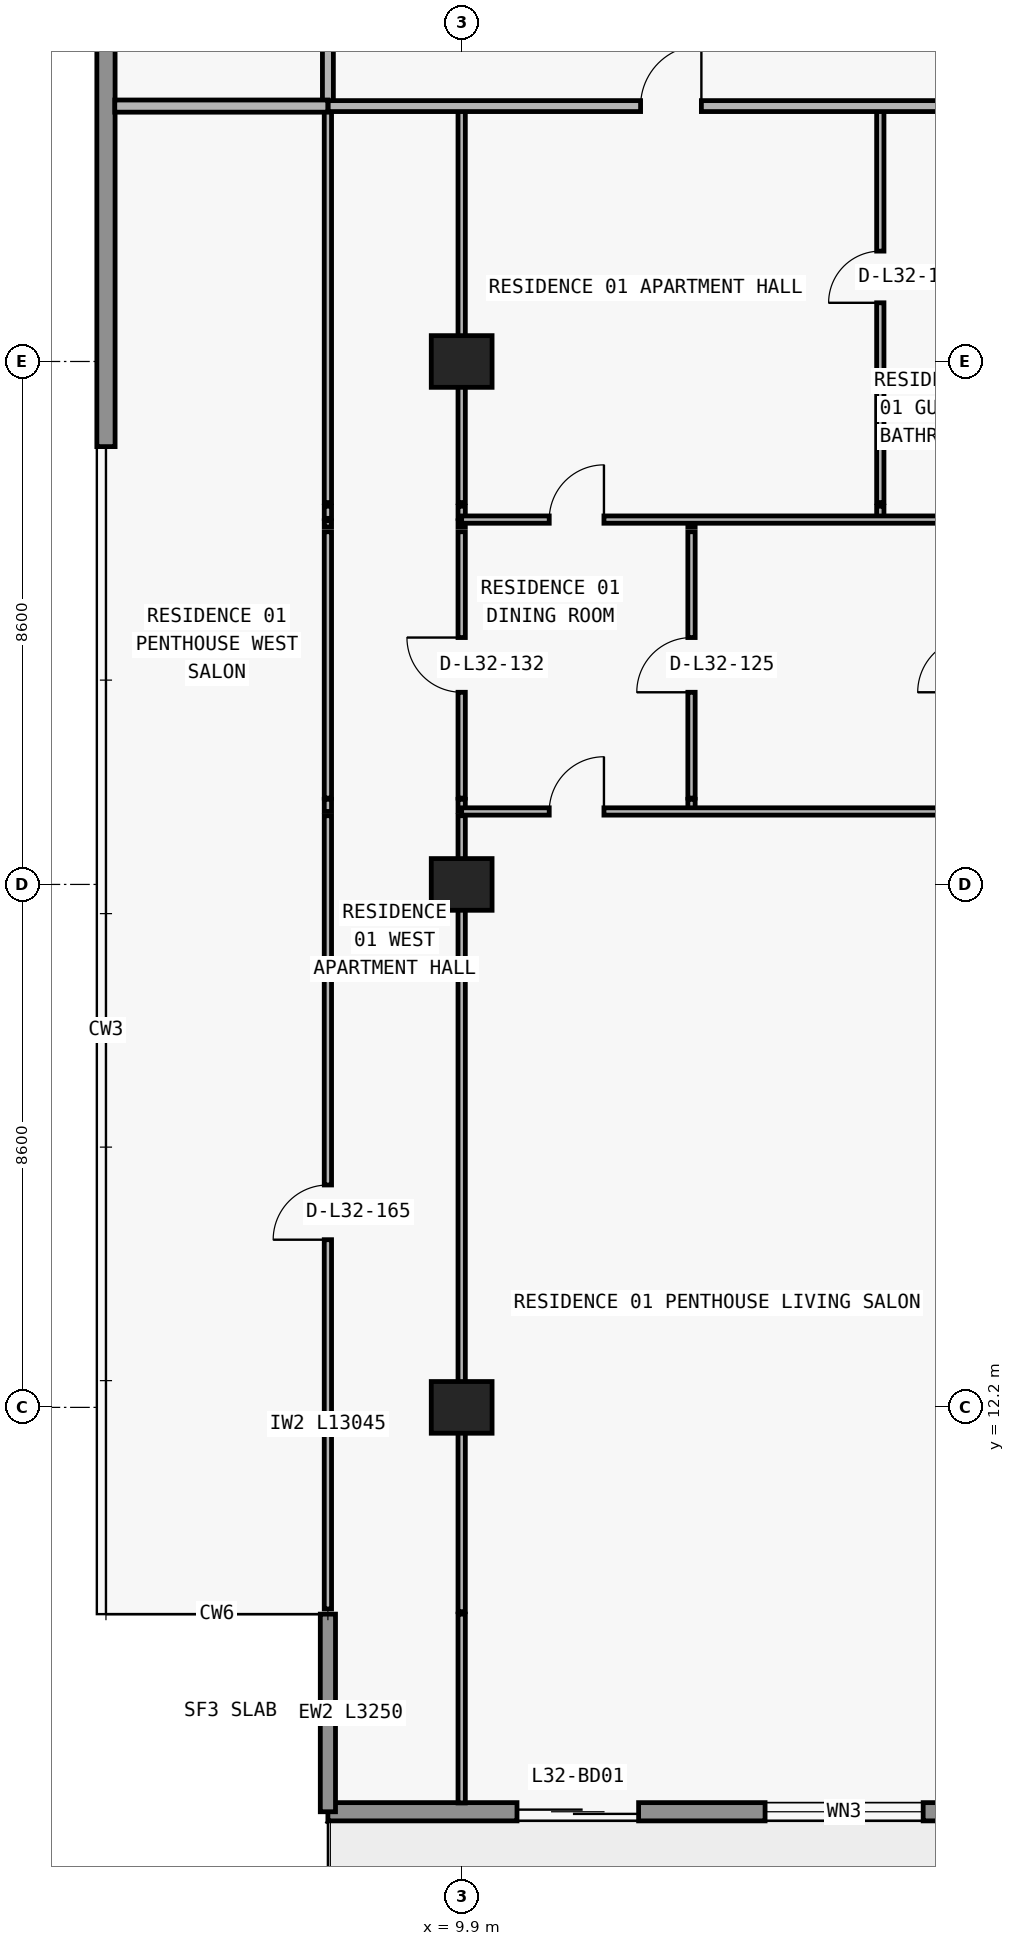
"""IFC4 building model, lengths in metres.
Left out: names, types, materials, properties, quantities, classifications, styles, units other than length and angle.
Written with IfcOpenShell. Run it as: python <this file> out.ifc"""

import sys

from ifc_helpers import new_model, si_unit, direction, frame, frame_2d, origin, origin_2d, place, context, subcontext, project, spatial, rectangle, extrude, element, fill, save


model = new_model("IFC4")
c1 = context("Model", 3, precision=1e-05, world=origin(), true_north=direction((0.0, 1.0)))
c2 = subcontext(c1, "Body", "Model", "MODEL_VIEW")
j1 = project(units=[si_unit("LENGTHUNIT", "METRE"), si_unit("PLANEANGLEUNIT", "RADIAN")], contexts=[c1])
p1 = place(None, origin())
s1 = spatial("IfcSite", under=j1, at=p1, CompositionType="ELEMENT")
p2 = place(p1, origin())
s2 = spatial("IfcBuilding", under=s1, at=p2, CompositionType="ELEMENT")
p3 = place(p2, frame((0.0, 0.0, 119.1)))
s3 = spatial("IfcBuildingStorey", under=s2, at=p3, CompositionType="ELEMENT", Elevation=119.1)
for number, where, z_axis, x_axis in (
    (1, (9.9, 12.2, 0.0), (0.0, 0.0, 1.0), (1.0, 0.0, 0.0)),
    (2, (9.9, 20.8, 0.0), (0.0, 0.0, 1.0), (1.0, 0.0, 0.0)),
    (3, (9.9, 29.4, 0.0), (0.0, 0.0, 1.0), (1.0, 0.0, 0.0)),
):
    element("IfcColumn", number, at=place(p3, frame(where, z_axis=z_axis, x_axis=x_axis)), inside=s3, PredefinedType="COLUMN", context=c2, shape_type="SweptSolid", body=[
        extrude(rectangle(XDim=1.0, YDim=0.85, at=origin_2d()), origin(), (0.0, 0.0, 1.0), 3.05),
    ])
p4 = place(p3, frame((70.1, 5.55, 0.0), z_axis=(0.0, 0.0, 1.0), x_axis=(-1.0, 0.0, 0.0)))
e4 = element("IfcWall", 4, at=p4, inside=s3, PredefinedType="STANDARD", context=c2, shape_type="SweptSolid", body=[
    extrude(rectangle(XDim=62.4, YDim=0.3, at=frame_2d((31.2, 0.0))), origin(), (0.0, 0.0, 1.0), 3.05),
])
p5 = place(p4, frame((57.29, 0.0, 0.0)))
e5 = element("IfcOpeningElement", 5, at=p5, cuts=e4, PredefinedType="OPENING", context=c2, shape_type="SweptSolid", body=[
    extrude(rectangle(XDim=2.0, YDim=2.3, at=frame_2d((1.0, 1.15))), frame((0.0, 0.16, 0.0), z_axis=(0.0, -1.0, 0.0), x_axis=(1.0, 0.0, 0.0)), (0.0, 0.0, 1.0), 0.32),
])
p6 = place(p4, frame((52.61, 0.0, 0.65)))
e6 = element("IfcOpeningElement", 6, at=p6, cuts=e4, PredefinedType="OPENING", context=c2, shape_type="SweptSolid", body=[
    extrude(rectangle(XDim=2.6, YDim=1.85, at=frame_2d((1.3, 0.925))), frame((0.0, 0.16, 0.0), z_axis=(0.0, -1.0, 0.0), x_axis=(1.0, 0.0, 0.0)), (0.0, 0.0, 1.0), 0.32),
])
p7 = place(p4, frame((46.5, 0.0, 0.85)))
e7 = element("IfcOpeningElement", 7, at=p7, cuts=e4, PredefinedType="OPENING", context=c2, shape_type="SweptSolid", body=[
    extrude(rectangle(XDim=2.2, YDim=1.55, at=frame_2d((1.1, 0.775))), frame((0.0, 0.16, 0.0), z_axis=(0.0, -1.0, 0.0), x_axis=(1.0, 0.0, 0.0)), (0.0, 0.0, 1.0), 0.32),
])
p8 = place(p4, frame((40.49, 0.0, 0.0)))
e8 = element("IfcOpeningElement", 8, at=p8, cuts=e4, PredefinedType="OPENING", context=c2, shape_type="SweptSolid", body=[
    extrude(rectangle(XDim=2.0, YDim=2.3, at=frame_2d((1.0, 1.15))), frame((0.0, 0.16, 0.0), z_axis=(0.0, -1.0, 0.0), x_axis=(1.0, 0.0, 0.0)), (0.0, 0.0, 1.0), 0.32),
])
p9 = place(p4, frame((35.81, 0.0, 0.65)))
e9 = element("IfcOpeningElement", 9, at=p9, cuts=e4, PredefinedType="OPENING", context=c2, shape_type="SweptSolid", body=[
    extrude(rectangle(XDim=2.6, YDim=1.85, at=frame_2d((1.3, 0.925))), frame((0.0, 0.16, 0.0), z_axis=(0.0, -1.0, 0.0), x_axis=(1.0, 0.0, 0.0)), (0.0, 0.0, 1.0), 0.32),
])
p10 = place(p4, frame((30.1, 0.0, 0.85)))
e10 = element("IfcOpeningElement", 10, at=p10, cuts=e4, PredefinedType="OPENING", context=c2, shape_type="SweptSolid", body=[
    extrude(rectangle(XDim=2.2, YDim=1.55, at=frame_2d((1.1, 0.775))), frame((0.0, 0.16, 0.0), z_axis=(0.0, -1.0, 0.0), x_axis=(1.0, 0.0, 0.0)), (0.0, 0.0, 1.0), 0.32),
])
p11 = place(p4, frame((24.426, 0.0, 0.0)))
e11 = element("IfcOpeningElement", 11, at=p11, cuts=e4, PredefinedType="OPENING", context=c2, shape_type="SweptSolid", body=[
    extrude(rectangle(XDim=2.0, YDim=2.3, at=frame_2d((1.0, 1.15))), frame((0.0, 0.16, 0.0), z_axis=(0.0, -1.0, 0.0), x_axis=(1.0, 0.0, 0.0)), (0.0, 0.0, 1.0), 0.32),
])
p12 = place(p4, frame((20.126, 0.0, 0.85)))
e12 = element("IfcOpeningElement", 12, at=p12, cuts=e4, PredefinedType="OPENING", context=c2, shape_type="SweptSolid", body=[
    extrude(rectangle(XDim=2.2, YDim=1.55, at=frame_2d((1.1, 0.775))), frame((0.0, 0.16, 0.0), z_axis=(0.0, -1.0, 0.0), x_axis=(1.0, 0.0, 0.0)), (0.0, 0.0, 1.0), 0.32),
])
p13 = place(p4, frame((15.69, 0.0, 0.0)))
e13 = element("IfcOpeningElement", 13, at=p13, cuts=e4, PredefinedType="OPENING", context=c2, shape_type="SweptSolid", body=[
    extrude(rectangle(XDim=2.0, YDim=2.3, at=frame_2d((1.0, 1.15))), frame((0.0, 0.16, 0.0), z_axis=(0.0, -1.0, 0.0), x_axis=(1.0, 0.0, 0.0)), (0.0, 0.0, 1.0), 0.32),
])
p14 = place(p4, frame((11.59, 0.0, 0.85)))
e14 = element("IfcOpeningElement", 14, at=p14, cuts=e4, PredefinedType="OPENING", context=c2, shape_type="SweptSolid", body=[
    extrude(rectangle(XDim=1.8, YDim=1.55, at=frame_2d((0.9, 0.775))), frame((0.0, 0.16, 0.0), z_axis=(0.0, -1.0, 0.0), x_axis=(1.0, 0.0, 0.0)), (0.0, 0.0, 1.0), 0.32),
])
p15 = place(p4, frame((7.626, 0.0, 0.0)))
e15 = element("IfcOpeningElement", 15, at=p15, cuts=e4, PredefinedType="OPENING", context=c2, shape_type="SweptSolid", body=[
    extrude(rectangle(XDim=2.0, YDim=2.3, at=frame_2d((1.0, 1.15))), frame((0.0, 0.16, 0.0), z_axis=(0.0, -1.0, 0.0), x_axis=(1.0, 0.0, 0.0)), (0.0, 0.0, 1.0), 0.32),
])
p16 = place(p4, frame((3.326, 0.0, 0.85)))
e16 = element("IfcOpeningElement", 16, at=p16, cuts=e4, PredefinedType="OPENING", context=c2, shape_type="SweptSolid", body=[
    extrude(rectangle(XDim=2.2, YDim=1.55, at=frame_2d((1.1, 0.775))), frame((0.0, 0.16, 0.0), z_axis=(0.0, -1.0, 0.0), x_axis=(1.0, 0.0, 0.0)), (0.0, 0.0, 1.0), 0.32),
])
p17 = place(p3, frame((7.7, 8.8, 0.0), z_axis=(0.0, 0.0, 1.0), x_axis=(0.0, -1.0, 0.0)))
e17 = element("IfcWall", 17, at=p17, inside=s3, PredefinedType="ELEMENTEDWALL", context=c2, shape_type="SweptSolid", body=[
    extrude(rectangle(XDim=3.25, YDim=0.25, at=frame_2d((1.625, 0.0))), origin(), (0.0, 0.0, 1.0), 3.05),
])
p18 = place(p3, frame((4.05, 28.0, 0.0), z_axis=(0.0, 0.0, 1.0), x_axis=(0.0, 1.0, 0.0)))
e18 = element("IfcWall", 18, at=p18, inside=s3, PredefinedType="STANDARD", context=c2, shape_type="SweptSolid", body=[
    extrude(rectangle(XDim=19.2, YDim=0.3, at=frame_2d((9.6, 0.0))), origin(), (0.0, 0.0, 1.0), 3.05),
])
p19 = place(p3, frame((7.7, 8.885, 0.0), z_axis=(0.0, 0.0, 1.0), x_axis=(0.0, 1.0, 0.0)))
e19 = element("IfcWall", 19, at=p19, inside=s3, PredefinedType="PARTITIONING", context=c2, shape_type="SweptSolid", body=[
    extrude(rectangle(XDim=13.045, YDim=0.12, at=frame_2d((6.522, 0.0))), origin(), (0.0, 0.0, 1.0), 3.05),
])
p20 = place(p19, frame((6.073, 0.0, 0.0)))
e20 = element("IfcOpeningElement", 20, at=p20, cuts=e19, PredefinedType="OPENING", context=c2, shape_type="SweptSolid", body=[
    extrude(rectangle(XDim=0.9, YDim=2.15, at=frame_2d((0.45, 1.075))), frame((0.0, 0.07, 0.0), z_axis=(0.0, -1.0, 0.0), x_axis=(1.0, 0.0, 0.0)), (0.0, 0.0, 1.0), 0.14),
])
p21 = place(p3, frame((7.7, 22.0, 0.0), z_axis=(0.0, 0.0, 1.0), x_axis=(0.0, 1.0, 0.0)))
e21 = element("IfcWall", 21, at=p21, inside=s3, PredefinedType="PARTITIONING", context=c2, shape_type="SweptSolid", body=[
    extrude(rectangle(XDim=0.2, YDim=0.12, at=frame_2d((0.1, 0.0))), origin(), (0.0, 0.0, 1.0), 3.05),
])
p22 = place(p3, frame((7.7, 22.22, 0.0), z_axis=(0.0, 0.0, 1.0), x_axis=(0.0, 1.0, 0.0)))
e22 = element("IfcWall", 22, at=p22, inside=s3, PredefinedType="PARTITIONING", context=c2, shape_type="SweptSolid", body=[
    extrude(rectangle(XDim=4.38, YDim=0.12, at=frame_2d((2.19, 0.0))), origin(), (0.0, 0.0, 1.0), 3.05),
])
p23 = place(p3, frame((7.7, 26.68, 0.0), z_axis=(0.0, 0.0, 1.0), x_axis=(0.0, 1.0, 0.0)))
e23 = element("IfcWall", 23, at=p23, inside=s3, PredefinedType="PARTITIONING", context=c2, shape_type="SweptSolid", body=[
    extrude(rectangle(XDim=0.1, YDim=0.12, at=frame_2d((0.05, 0.0))), origin(), (0.0, 0.0, 1.0), 3.05),
])
p24 = place(p3, frame((7.7, 26.82, 0.0), z_axis=(0.0, 0.0, 1.0), x_axis=(0.0, 1.0, 0.0)))
e24 = element("IfcWall", 24, at=p24, inside=s3, PredefinedType="PARTITIONING", context=c2, shape_type="SweptSolid", body=[
    extrude(rectangle(XDim=0.2, YDim=0.12, at=frame_2d((0.1, 0.0))), origin(), (0.0, 0.0, 1.0), 3.05),
])
p25 = place(p3, frame((7.7, 27.08, 0.0), z_axis=(0.0, 0.0, 1.0), x_axis=(0.0, 1.0, 0.0)))
e25 = element("IfcWall", 25, at=p25, inside=s3, PredefinedType="PARTITIONING", context=c2, shape_type="SweptSolid", body=[
    extrude(rectangle(XDim=6.52, YDim=0.12, at=frame_2d((3.26, 0.0))), origin(), (0.0, 0.0, 1.0), 3.05),
])
p26 = place(p3, frame((7.7, 33.605, 0.0), z_axis=(0.0, 0.0, 1.0), x_axis=(0.0, 1.0, 0.0)))
e26 = element("IfcWall", 26, at=p26, inside=s3, PredefinedType="PARTITIONING", context=c2, shape_type="SweptSolid", body=[
    extrude(rectangle(XDim=3.345, YDim=0.18, at=frame_2d((1.672, 0.0))), origin(), (0.0, 0.0, 1.0), 3.05),
])
p27 = place(p3, frame((9.9, 5.695, 0.0), z_axis=(0.0, 0.0, 1.0), x_axis=(0.0, 1.0, 0.0)))
e27 = element("IfcWall", 27, at=p27, inside=s3, PredefinedType="PARTITIONING", context=c2, shape_type="SweptSolid", body=[
    extrude(rectangle(XDim=3.105, YDim=0.12, at=frame_2d((1.552, 0.0))), origin(), (0.0, 0.0, 1.0), 3.05),
])
p28 = place(p3, frame((9.9, 8.84, 0.0), z_axis=(0.0, 0.0, 1.0), x_axis=(0.0, 1.0, 0.0)))
e28 = element("IfcWall", 28, at=p28, inside=s3, PredefinedType="PARTITIONING", context=c2, shape_type="SweptSolid", body=[
    extrude(rectangle(XDim=13.09, YDim=0.12, at=frame_2d((6.545, 0.0))), origin(), (0.0, 0.0, 1.0), 2.174),
])
p29 = place(p3, frame((9.9, 22.0, 0.0), z_axis=(0.0, 0.0, 1.0), x_axis=(0.0, 1.0, 0.0)))
e29 = element("IfcWall", 29, at=p29, inside=s3, PredefinedType="PARTITIONING", context=c2, shape_type="SweptSolid", body=[
    extrude(rectangle(XDim=0.2, YDim=0.12, at=frame_2d((0.1, 0.0))), origin(), (0.0, 0.0, 1.0), 2.174),
])
p30 = place(p3, frame((9.9, 22.22, 0.0), z_axis=(0.0, 0.0, 1.0), x_axis=(0.0, 1.0, 0.0)))
e30 = element("IfcWall", 30, at=p30, inside=s3, PredefinedType="PARTITIONING", context=c2, shape_type="SweptSolid", body=[
    extrude(rectangle(XDim=4.38, YDim=0.12, at=frame_2d((2.19, 0.0))), origin(), (0.0, 0.0, 1.0), 2.174),
])
p31 = place(p30, frame((1.74, 0.0, 0.0)))
e31 = element("IfcOpeningElement", 31, at=p31, cuts=e30, PredefinedType="OPENING", context=c2, shape_type="SweptSolid", body=[
    extrude(rectangle(XDim=0.9, YDim=2.124, at=frame_2d((0.45, 1.062))), frame((0.0, 0.07, 0.0), z_axis=(0.0, -1.0, 0.0), x_axis=(1.0, 0.0, 0.0)), (0.0, 0.0, 1.0), 0.14),
])
p32 = place(p3, frame((9.9, 26.68, 0.0), z_axis=(0.0, 0.0, 1.0), x_axis=(0.0, 1.0, 0.0)))
e32 = element("IfcWall", 32, at=p32, inside=s3, PredefinedType="PARTITIONING", context=c2, shape_type="SweptSolid", body=[
    extrude(rectangle(XDim=0.1, YDim=0.12, at=frame_2d((0.05, 0.0))), origin(), (0.0, 0.0, 1.0), 2.174),
])
p33 = place(p3, frame((9.9, 26.82, 0.0), z_axis=(0.0, 0.0, 1.0), x_axis=(0.0, 1.0, 0.0)))
e33 = element("IfcWall", 33, at=p33, inside=s3, PredefinedType="PARTITIONING", context=c2, shape_type="SweptSolid", body=[
    extrude(rectangle(XDim=0.2, YDim=0.12, at=frame_2d((0.1, 0.0))), origin(), (0.0, 0.0, 1.0), 2.174),
])
p34 = place(p3, frame((9.9, 27.08, 0.0), z_axis=(0.0, 0.0, 1.0), x_axis=(0.0, 1.0, 0.0)))
e34 = element("IfcWall", 34, at=p34, inside=s3, PredefinedType="PARTITIONING", context=c2, shape_type="SweptSolid", body=[
    extrude(rectangle(XDim=6.52, YDim=0.12, at=frame_2d((3.26, 0.0))), origin(), (0.0, 0.0, 1.0), 2.174),
])
p35 = place(p3, frame((13.68, 22.0, 0.0), z_axis=(0.0, 0.0, 1.0), x_axis=(0.0, 1.0, 0.0)))
e35 = element("IfcWall", 35, at=p35, inside=s3, PredefinedType="PARTITIONING", context=c2, shape_type="SweptSolid", body=[
    extrude(rectangle(XDim=0.2, YDim=0.12, at=frame_2d((0.1, 0.0))), origin(), (0.0, 0.0, 1.0), 3.05),
])
p36 = place(p3, frame((13.68, 22.22, 0.0), z_axis=(0.0, 0.0, 1.0), x_axis=(0.0, 1.0, 0.0)))
e36 = element("IfcWall", 36, at=p36, inside=s3, PredefinedType="PARTITIONING", context=c2, shape_type="SweptSolid", body=[
    extrude(rectangle(XDim=4.38, YDim=0.12, at=frame_2d((2.19, 0.0))), origin(), (0.0, 0.0, 1.0), 3.05),
])
p37 = place(p36, frame((1.74, 0.0, 0.0)))
e37 = element("IfcOpeningElement", 37, at=p37, cuts=e36, PredefinedType="OPENING", context=c2, shape_type="SweptSolid", body=[
    extrude(rectangle(XDim=0.9, YDim=2.15, at=frame_2d((0.45, 1.075))), frame((0.0, 0.07, 0.0), z_axis=(0.0, -1.0, 0.0), x_axis=(1.0, 0.0, 0.0)), (0.0, 0.0, 1.0), 0.14),
])
p38 = place(p3, frame((13.68, 26.68, 0.0), z_axis=(0.0, 0.0, 1.0), x_axis=(0.0, 1.0, 0.0)))
e38 = element("IfcWall", 38, at=p38, inside=s3, PredefinedType="PARTITIONING", context=c2, shape_type="SweptSolid", body=[
    extrude(rectangle(XDim=0.1, YDim=0.12, at=frame_2d((0.05, 0.0))), origin(), (0.0, 0.0, 1.0), 3.05),
])
p39 = place(p3, frame((16.785, 26.82, 0.0), z_axis=(0.0, 0.0, 1.0), x_axis=(0.0, 1.0, 0.0)))
e39 = element("IfcWall", 39, at=p39, inside=s3, PredefinedType="PARTITIONING", context=c2, shape_type="SweptSolid", body=[
    extrude(rectangle(XDim=0.2, YDim=0.12, at=frame_2d((0.1, 0.0))), origin(), (0.0, 0.0, 1.0), 3.05),
])
p40 = place(p3, frame((16.785, 27.08, 0.0), z_axis=(0.0, 0.0, 1.0), x_axis=(0.0, 1.0, 0.0)))
e40 = element("IfcWall", 40, at=p40, inside=s3, PredefinedType="PARTITIONING", context=c2, shape_type="SweptSolid", body=[
    extrude(rectangle(XDim=6.52, YDim=0.12, at=frame_2d((3.26, 0.0))), origin(), (0.0, 0.0, 1.0), 3.05),
])
p41 = place(p40, frame((3.285, 0.0, 0.0)))
e41 = element("IfcOpeningElement", 41, at=p41, cuts=e40, PredefinedType="OPENING", context=c2, shape_type="SweptSolid", body=[
    extrude(rectangle(XDim=0.85, YDim=2.1, at=frame_2d((0.425, 1.05))), frame((0.0, 0.07, 0.0), z_axis=(0.0, -1.0, 0.0), x_axis=(1.0, 0.0, 0.0)), (0.0, 0.0, 1.0), 0.14),
])
p42 = place(p3, frame((9.9, 22.0, 0.0), z_axis=(0.0, 0.0, 1.0), x_axis=(1.0, 0.0, 0.0)))
e42 = element("IfcWall", 42, at=p42, inside=s3, PredefinedType="PARTITIONING", context=c2, shape_type="SweptSolid", body=[
    extrude(rectangle(XDim=8.35, YDim=0.12, at=frame_2d((4.175, 0.0))), origin(), (0.0, 0.0, 1.0), 3.05),
])
p43 = place(p42, frame((1.44, 0.0, 0.0)))
e43 = element("IfcOpeningElement", 43, at=p43, cuts=e42, PredefinedType="OPENING", context=c2, shape_type="SweptSolid", body=[
    extrude(rectangle(XDim=0.9, YDim=2.15, at=frame_2d((0.45, 1.075))), frame((0.0, 0.07, 0.0), z_axis=(0.0, -1.0, 0.0), x_axis=(1.0, 0.0, 0.0)), (0.0, 0.0, 1.0), 0.14),
])
p44 = place(p3, frame((9.9, 26.8, 0.0), z_axis=(0.0, 0.0, 1.0), x_axis=(1.0, 0.0, 0.0)))
e44 = element("IfcWall", 44, at=p44, inside=s3, PredefinedType="PARTITIONING", context=c2, shape_type="SweptSolid", body=[
    extrude(rectangle(XDim=8.35, YDim=0.12, at=frame_2d((4.175, 0.0))), origin(), (0.0, 0.0, 1.0), 3.05),
])
p45 = place(p44, frame((1.44, 0.0, 0.0)))
e45 = element("IfcOpeningElement", 45, at=p45, cuts=e44, PredefinedType="OPENING", context=c2, shape_type="SweptSolid", body=[
    extrude(rectangle(XDim=0.9, YDim=2.15, at=frame_2d((0.45, 1.075))), frame((0.0, 0.07, 0.0), z_axis=(0.0, -1.0, 0.0), x_axis=(1.0, 0.0, 0.0)), (0.0, 0.0, 1.0), 0.14),
])
p46 = place(p3, frame((4.195, 33.6, 0.0), z_axis=(0.0, 0.0, 1.0), x_axis=(1.0, 0.0, 0.0)))
e46 = element("IfcWall", 46, at=p46, inside=s3, PredefinedType="PARTITIONING", context=c2, shape_type="SweptSolid", body=[
    extrude(rectangle(XDim=3.505, YDim=0.2, at=frame_2d((1.752, 0.0))), origin(), (0.0, 0.0, 1.0), 3.05),
])
p47 = place(p3, frame((7.705, 33.6, 0.0), z_axis=(0.0, 0.0, 1.0), x_axis=(1.0, 0.0, 0.0)))
e47 = element("IfcWall", 47, at=p47, inside=s3, PredefinedType="PARTITIONING", context=c2, shape_type="SweptSolid", body=[
    extrude(rectangle(XDim=10.545, YDim=0.18, at=frame_2d((5.272, 0.0))), origin(), (0.0, 0.0, 1.0), 3.05),
])
p48 = place(p47, frame((5.137, 0.0, 0.0)))
e48 = element("IfcOpeningElement", 48, at=p48, cuts=e47, PredefinedType="OPENING", context=c2, shape_type="SweptSolid", body=[
    extrude(rectangle(XDim=1.0, YDim=2.2, at=frame_2d((0.5, 1.1))), frame((0.0, 0.1, 0.0), z_axis=(0.0, -1.0, 0.0), x_axis=(1.0, 0.0, 0.0)), (0.0, 0.0, 1.0), 0.2),
])
p49 = place(p5, origin())
e49 = element("IfcDoor", 49, at=p49, inside=s3, OperationType="DOUBLE_DOOR_SLIDING", PredefinedType="DOOR", context=c2, shape_type="SweptSolid", body=[
    extrude(rectangle(XDim=2.0, YDim=2.3, at=frame_2d((1.0, 1.15))), frame((0.0, 0.025, 0.0), z_axis=(0.0, -1.0, 0.0), x_axis=(1.0, 0.0, 0.0)), (0.0, 0.0, 1.0), 0.05),
])
fill(e5, e49)
p50 = place(p6, origin())
e50 = element("IfcWindow", 50, at=p50, inside=s3, PartitioningType="SINGLE_PANEL", PredefinedType="WINDOW", context=c2, shape_type="SweptSolid", body=[
    extrude(rectangle(XDim=2.6, YDim=1.85, at=frame_2d((1.3, 0.925))), frame((0.0, 0.03, 0.0), z_axis=(0.0, -1.0, 0.0), x_axis=(1.0, 0.0, 0.0)), (0.0, 0.0, 1.0), 0.06),
])
fill(e6, e50)
p51 = place(p48, origin())
e51 = element("IfcDoor", 51, at=p51, inside=s3, OperationType="SINGLE_SWING_RIGHT", PredefinedType="DOOR", context=c2, shape_type="SweptSolid", body=[
    extrude(rectangle(XDim=1.0, YDim=2.2, at=frame_2d((0.5, 1.1))), frame((0.0, 0.025, 0.0), z_axis=(0.0, -1.0, 0.0), x_axis=(1.0, 0.0, 0.0)), (0.0, 0.0, 1.0), 0.05),
])
fill(e48, e51)
p52 = place(p41, origin())
e52 = element("IfcDoor", 52, at=p52, inside=s3, OperationType="SINGLE_SWING_LEFT", PredefinedType="DOOR", context=c2, shape_type="SweptSolid", body=[
    extrude(rectangle(XDim=0.85, YDim=2.1, at=frame_2d((0.425, 1.05))), frame((0.0, 0.025, 0.0), z_axis=(0.0, -1.0, 0.0), x_axis=(1.0, 0.0, 0.0)), (0.0, 0.0, 1.0), 0.05),
])
fill(e41, e52)
p53 = place(p45, origin())
e53 = element("IfcDoor", 53, at=p53, inside=s3, OperationType="SINGLE_SWING_RIGHT", PredefinedType="DOOR", context=c2, shape_type="SweptSolid", body=[
    extrude(rectangle(XDim=0.9, YDim=2.15, at=frame_2d((0.45, 1.075))), frame((0.0, 0.025, 0.0), z_axis=(0.0, -1.0, 0.0), x_axis=(1.0, 0.0, 0.0)), (0.0, 0.0, 1.0), 0.05),
])
fill(e45, e53)
p54 = place(p37, origin())
e54 = element("IfcDoor", 54, at=p54, inside=s3, OperationType="SINGLE_SWING_LEFT", PredefinedType="DOOR", context=c2, shape_type="SweptSolid", body=[
    extrude(rectangle(XDim=0.9, YDim=2.15, at=frame_2d((0.45, 1.075))), frame((0.0, 0.025, 0.0), z_axis=(0.0, -1.0, 0.0), x_axis=(1.0, 0.0, 0.0)), (0.0, 0.0, 1.0), 0.05),
])
fill(e37, e54)
p55 = place(p43, origin())
e55 = element("IfcDoor", 55, at=p55, inside=s3, OperationType="SINGLE_SWING_RIGHT", PredefinedType="DOOR", context=c2, shape_type="SweptSolid", body=[
    extrude(rectangle(XDim=0.9, YDim=2.15, at=frame_2d((0.45, 1.075))), frame((0.0, 0.025, 0.0), z_axis=(0.0, -1.0, 0.0), x_axis=(1.0, 0.0, 0.0)), (0.0, 0.0, 1.0), 0.05),
])
fill(e43, e55)
p56 = place(p31, origin())
e56 = element("IfcDoor", 56, at=p56, inside=s3, OperationType="SINGLE_SWING_RIGHT", PredefinedType="DOOR", context=c2, shape_type="SweptSolid", body=[
    extrude(rectangle(XDim=0.9, YDim=2.124, at=frame_2d((0.45, 1.062))), frame((0.0, 0.025, 0.0), z_axis=(0.0, -1.0, 0.0), x_axis=(1.0, 0.0, 0.0)), (0.0, 0.0, 1.0), 0.05),
])
fill(e31, e56)
p57 = place(p20, origin())
e57 = element("IfcDoor", 57, at=p57, inside=s3, OperationType="SINGLE_SWING_LEFT", PredefinedType="DOOR", context=c2, shape_type="SweptSolid", body=[
    extrude(rectangle(XDim=0.9, YDim=2.15, at=frame_2d((0.45, 1.075))), frame((0.0, 0.025, 0.0), z_axis=(0.0, -1.0, 0.0), x_axis=(1.0, 0.0, 0.0)), (0.0, 0.0, 1.0), 0.05),
])
fill(e20, e57)
save(model, sys.argv[1])
